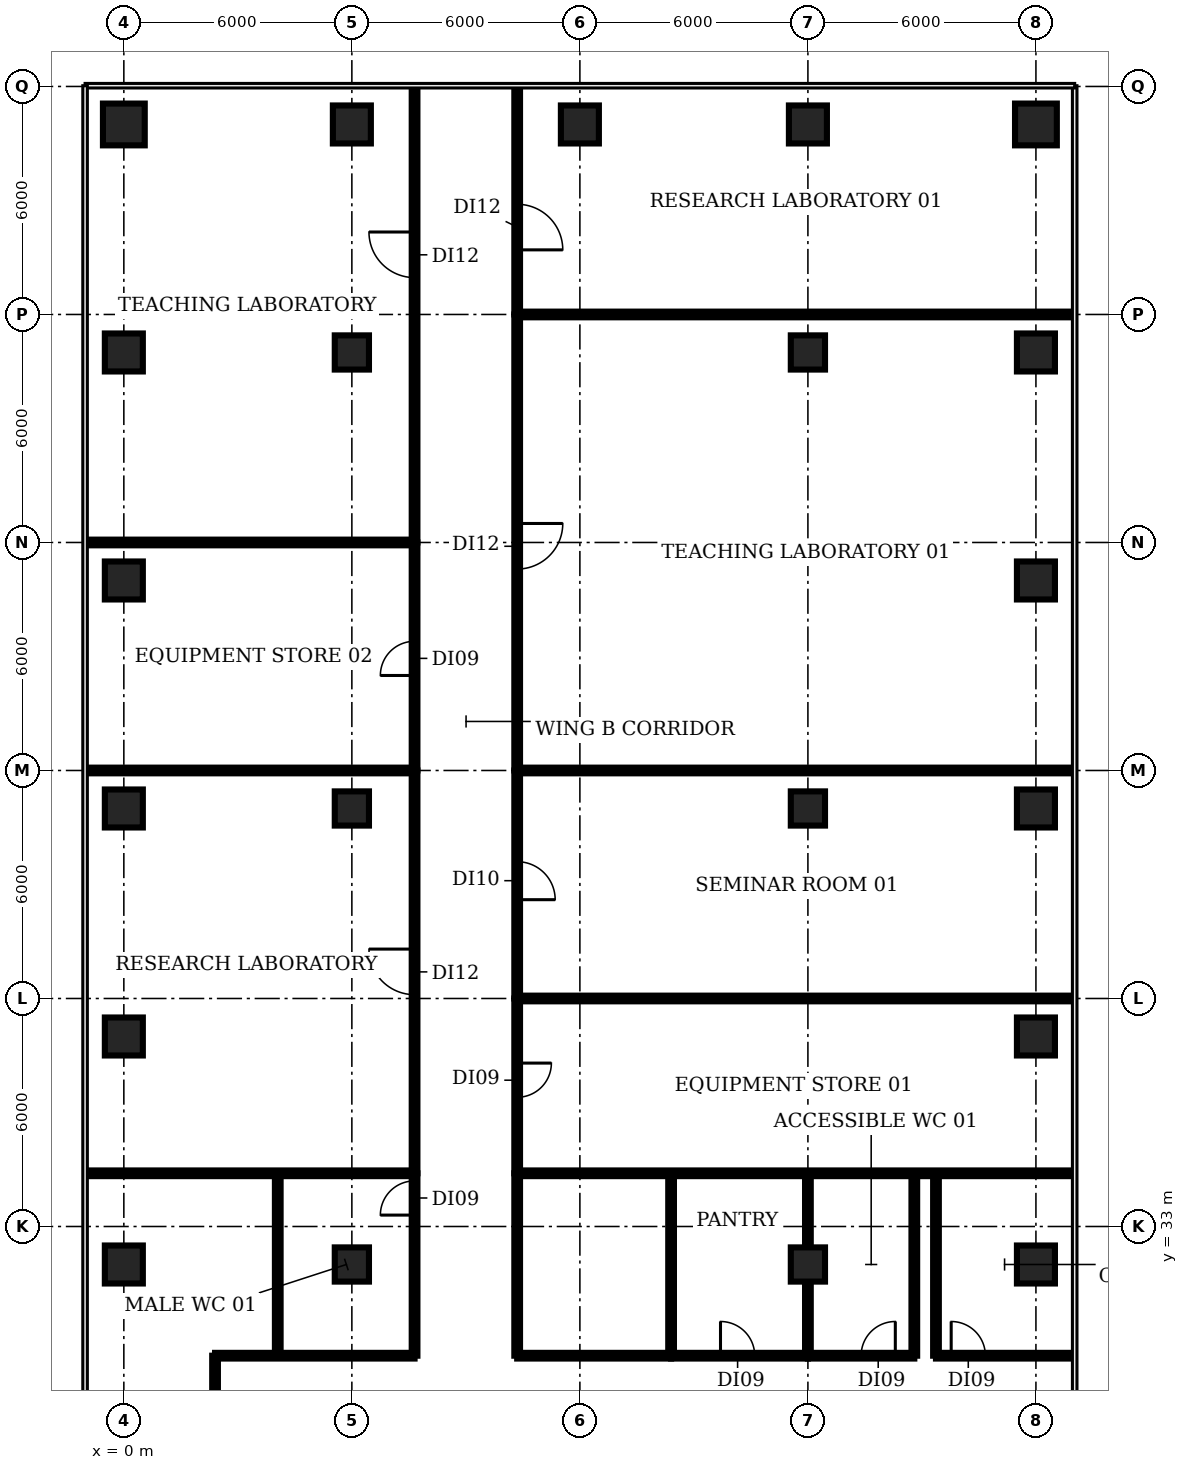
"""IFC4 building model, lengths in metres.
Left out: names, types, materials, properties, quantities, classifications, styles, units other than length and angle.
Written with IfcOpenShell. Run it as: python <this file> out.ifc"""

import sys

from ifc_helpers import new_model, si_unit, direction, frame, frame_2d, origin, origin_2d, place, context, subcontext, project, spatial, rectangle, circle, extrude, element, fill, save


model = new_model("IFC4")
c1 = context("Model", 3, precision=1e-05, world=origin(), true_north=direction((0.0, 1.0)))
c2 = subcontext(c1, "Body", "Model", "MODEL_VIEW")
j1 = project(units=[si_unit("LENGTHUNIT", "METRE"), si_unit("PLANEANGLEUNIT", "RADIAN")], contexts=[c1])
p1 = place(None, origin())
s1 = spatial("IfcSite", under=j1, at=p1, CompositionType="ELEMENT")
p2 = place(p1, origin())
s2 = spatial("IfcBuilding", under=s1, at=p2, CompositionType="ELEMENT")
p3 = place(p2, frame((0.0, 0.0, 20.0)))
s3 = spatial("IfcBuildingStorey", under=s2, at=p3, CompositionType="ELEMENT", Elevation=20.0)
for number, where, z_axis, x_axis in (
    (1, (0.0, 32.0, 0.0), (0.0, 0.0, 1.0), (1.0, 0.0, 0.0)),
    (2, (0.0, 38.0, 0.0), (0.0, 0.0, 1.0), (1.0, 0.0, 0.0)),
    (3, (0.0, 44.0, 0.0), (0.0, 0.0, 1.0), (1.0, 0.0, 0.0)),
    (4, (0.0, 50.0, 0.0), (0.0, 0.0, 1.0), (1.0, 0.0, 0.0)),
    (5, (0.0, 56.0, 0.0), (0.0, 0.0, 1.0), (1.0, 0.0, 0.0)),
):
    element("IfcColumn", number, at=place(p3, frame(where, z_axis=z_axis, x_axis=x_axis)), inside=s3, PredefinedType="COLUMN", context=c2, shape_type="SweptSolid", body=[
        extrude(rectangle(XDim=1.0, YDim=1.0, at=origin_2d()), origin(), (0.0, 0.0, 1.0), 4.15),
    ])
p4 = place(p3, frame((0.0, 62.0, 0.0), z_axis=(0.0, 0.0, 1.0), x_axis=(1.0, 0.0, 0.0)))
e6 = element("IfcColumn", 6, at=p4, inside=s3, PredefinedType="COLUMN", context=c2, shape_type="SweptSolid", body=[
    extrude(circle(Radius=0.55, at=origin_2d()), origin(), (0.0, 0.0, 1.0), 4.15),
])
for number, where, z_axis, x_axis in (
    (7, (6.0, 32.0, 0.0), (0.0, 0.0, 1.0), (1.0, 0.0, 0.0)),
    (8, (6.0, 44.0, 0.0), (0.0, 0.0, 1.0), (1.0, 0.0, 0.0)),
    (9, (6.0, 56.0, 0.0), (0.0, 0.0, 1.0), (1.0, 0.0, 0.0)),
):
    element("IfcColumn", number, at=place(p3, frame(where, z_axis=z_axis, x_axis=x_axis)), inside=s3, PredefinedType="COLUMN", context=c2, shape_type="SweptSolid", body=[
        extrude(rectangle(XDim=0.9, YDim=0.9, at=origin_2d()), origin(), (0.0, 0.0, 1.0), 4.15),
    ])
for number, where, z_axis, x_axis in (
    (10, (6.0, 62.0, 0.0), (0.0, 0.0, 1.0), (1.0, 0.0, 0.0)),
    (11, (12.0, 62.0, 0.0), (0.0, 0.0, 1.0), (1.0, 0.0, 0.0)),
):
    element("IfcColumn", number, at=place(p3, frame(where, z_axis=z_axis, x_axis=x_axis)), inside=s3, PredefinedType="COLUMN", context=c2, shape_type="SweptSolid", body=[
        extrude(rectangle(XDim=1.0, YDim=1.0, at=origin_2d()), origin(), (0.0, 0.0, 1.0), 4.15),
    ])
for number, where, z_axis, x_axis in (
    (12, (18.0, 32.0, 0.0), (0.0, 0.0, 1.0), (1.0, 0.0, 0.0)),
    (13, (18.0, 44.0, 0.0), (0.0, 0.0, 1.0), (1.0, 0.0, 0.0)),
    (14, (18.0, 56.0, 0.0), (0.0, 0.0, 1.0), (1.0, 0.0, 0.0)),
):
    element("IfcColumn", number, at=place(p3, frame(where, z_axis=z_axis, x_axis=x_axis)), inside=s3, PredefinedType="COLUMN", context=c2, shape_type="SweptSolid", body=[
        extrude(rectangle(XDim=0.9, YDim=0.9, at=origin_2d()), origin(), (0.0, 0.0, 1.0), 4.15),
    ])
for number, where, z_axis, x_axis in (
    (15, (18.0, 62.0, 0.0), (0.0, 0.0, 1.0), (1.0, 0.0, 0.0)),
    (16, (24.0, 32.0, 0.0), (0.0, 0.0, 1.0), (1.0, 0.0, 0.0)),
    (17, (24.0, 38.0, 0.0), (0.0, 0.0, 1.0), (1.0, 0.0, 0.0)),
    (18, (24.0, 44.0, 0.0), (0.0, 0.0, 1.0), (1.0, 0.0, 0.0)),
    (19, (24.0, 50.0, 0.0), (0.0, 0.0, 1.0), (1.0, 0.0, 0.0)),
    (20, (24.0, 56.0, 0.0), (0.0, 0.0, 1.0), (1.0, 0.0, 0.0)),
):
    element("IfcColumn", number, at=place(p3, frame(where, z_axis=z_axis, x_axis=x_axis)), inside=s3, PredefinedType="COLUMN", context=c2, shape_type="SweptSolid", body=[
        extrude(rectangle(XDim=1.0, YDim=1.0, at=origin_2d()), origin(), (0.0, 0.0, 1.0), 4.15),
    ])
p5 = place(p3, frame((24.0, 62.0, 0.0), z_axis=(0.0, 0.0, 1.0), x_axis=(1.0, 0.0, 0.0)))
e21 = element("IfcColumn", 21, at=p5, inside=s3, PredefinedType="COLUMN", context=c2, shape_type="SweptSolid", body=[
    extrude(circle(Radius=0.55, at=origin_2d()), origin(), (0.0, 0.0, 1.0), 4.15),
])
for number, where, z_axis, x_axis in (
    (22, (-0.97, 34.4, 0.0), (0.0, 0.0, 1.0), (1.0, 0.0, 0.0)),
    (23, (-0.97, 45.0, 0.0), (0.0, 0.0, 1.0), (1.0, 0.0, 0.0)),
    (24, (-0.97, 51.0, 0.0), (0.0, 0.0, 1.0), (1.0, 0.0, 0.0)),
):
    element("IfcWall", number, at=place(p3, frame(where, z_axis=z_axis, x_axis=x_axis)), inside=s3, PredefinedType="PARTITIONING", context=c2, shape_type="SweptSolid", body=[
        extrude(rectangle(XDim=8.62, YDim=0.15, at=frame_2d((4.31, 0.0))), origin(), (0.0, 0.0, 1.0), 3.08),
    ])
p6 = place(p3, frame((2.4, 25.7, 0.0), z_axis=(0.0, 0.0, 1.0), x_axis=(0.0, 1.0, 0.0)))
e25 = element("IfcWall", 25, at=p6, inside=s3, PredefinedType="PARTITIONING", context=c2, shape_type="SweptSolid", body=[
    extrude(rectangle(XDim=3.9, YDim=0.15, at=frame_2d((1.95, 0.0))), origin(), (0.0, 0.0, 1.0), 3.08),
])
p7 = place(p3, frame((2.4, 29.6, 0.0), z_axis=(0.0, 0.0, 1.0), x_axis=(1.0, 0.0, 0.0)))
e26 = element("IfcWall", 26, at=p7, inside=s3, PredefinedType="PARTITIONING", context=c2, shape_type="SweptSolid", body=[
    extrude(rectangle(XDim=5.25, YDim=0.15, at=frame_2d((2.625, 0.0))), origin(), (0.0, 0.0, 1.0), 3.08),
])
p8 = place(p3, frame((4.05, 29.6, 0.0), z_axis=(0.0, 0.0, 1.0), x_axis=(0.0, 1.0, 0.0)))
e27 = element("IfcWall", 27, at=p8, inside=s3, PredefinedType="PARTITIONING", context=c2, shape_type="SweptSolid", body=[
    extrude(rectangle(XDim=4.8, YDim=0.15, at=frame_2d((2.4, 0.0))), origin(), (0.0, 0.0, 1.0), 3.08),
])
p9 = place(p3, frame((7.65, 29.6, 0.0), z_axis=(0.0, 0.0, 1.0), x_axis=(0.0, 1.0, 0.0)))
e28 = element("IfcWall", 28, at=p9, inside=s3, PredefinedType="PARTITIONING", context=c2, shape_type="SweptSolid", body=[
    extrude(rectangle(XDim=4.8, YDim=0.15, at=frame_2d((2.4, 0.0))), origin(), (0.0, 0.0, 1.0), 3.08),
])
p10 = place(p9, frame((3.7, 0.0, 0.0)))
e29 = element("IfcOpeningElement", 29, at=p10, cuts=e28, PredefinedType="OPENING", context=c2, shape_type="SweptSolid", body=[
    extrude(rectangle(XDim=0.9, YDim=2.1, at=frame_2d((0.45, 1.05))), frame((0.0, 0.085, 0.0), z_axis=(0.0, -1.0, 0.0), x_axis=(1.0, 0.0, 0.0)), (0.0, 0.0, 1.0), 0.17),
])
p11 = place(p3, frame((7.65, 34.4, 0.0), z_axis=(0.0, 0.0, 1.0), x_axis=(0.0, 1.0, 0.0)))
e30 = element("IfcWall", 30, at=p11, inside=s3, PredefinedType="PARTITIONING", context=c2, shape_type="SweptSolid", body=[
    extrude(rectangle(XDim=10.6, YDim=0.15, at=frame_2d((5.3, 0.0))), origin(), (0.0, 0.0, 1.0), 3.08),
])
p12 = place(p11, frame((4.7, 0.0, 0.0)))
e31 = element("IfcOpeningElement", 31, at=p12, cuts=e30, PredefinedType="OPENING", context=c2, shape_type="SweptSolid", body=[
    extrude(rectangle(XDim=1.2, YDim=2.1, at=frame_2d((0.6, 1.05))), frame((0.0, 0.085, 0.0), z_axis=(0.0, -1.0, 0.0), x_axis=(1.0, 0.0, 0.0)), (0.0, 0.0, 1.0), 0.17),
])
p13 = place(p3, frame((7.65, 45.0, 0.0), z_axis=(0.0, 0.0, 1.0), x_axis=(0.0, 1.0, 0.0)))
e32 = element("IfcWall", 32, at=p13, inside=s3, PredefinedType="PARTITIONING", context=c2, shape_type="SweptSolid", body=[
    extrude(rectangle(XDim=6.0, YDim=0.15, at=frame_2d((3.0, 0.0))), origin(), (0.0, 0.0, 1.0), 3.08),
])
p14 = place(p13, frame((2.5, 0.0, 0.0)))
e33 = element("IfcOpeningElement", 33, at=p14, cuts=e32, PredefinedType="OPENING", context=c2, shape_type="SweptSolid", body=[
    extrude(rectangle(XDim=0.9, YDim=2.1, at=frame_2d((0.45, 1.05))), frame((0.0, 0.085, 0.0), z_axis=(0.0, -1.0, 0.0), x_axis=(1.0, 0.0, 0.0)), (0.0, 0.0, 1.0), 0.17),
])
p15 = place(p3, frame((7.65, 51.0, 0.0), z_axis=(0.0, 0.0, 1.0), x_axis=(0.0, 1.0, 0.0)))
e34 = element("IfcWall", 34, at=p15, inside=s3, PredefinedType="PARTITIONING", context=c2, shape_type="SweptSolid", body=[
    extrude(rectangle(XDim=11.97, YDim=0.15, at=frame_2d((5.985, 0.0))), origin(), (0.0, 0.0, 1.0), 3.08),
])
p16 = place(p15, frame((6.97, 0.0, 0.0)))
e35 = element("IfcOpeningElement", 35, at=p16, cuts=e34, PredefinedType="OPENING", context=c2, shape_type="SweptSolid", body=[
    extrude(rectangle(XDim=1.2, YDim=2.1, at=frame_2d((0.6, 1.05))), frame((0.0, 0.085, 0.0), z_axis=(0.0, -1.0, 0.0), x_axis=(1.0, 0.0, 0.0)), (0.0, 0.0, 1.0), 0.17),
])
p17 = place(p3, frame((10.35, 29.6, 0.0), z_axis=(0.0, 0.0, 1.0), x_axis=(0.0, 1.0, 0.0)))
e36 = element("IfcWall", 36, at=p17, inside=s3, PredefinedType="PARTITIONING", context=c2, shape_type="SweptSolid", body=[
    extrude(rectangle(XDim=4.8, YDim=0.15, at=frame_2d((2.4, 0.0))), origin(), (0.0, 0.0, 1.0), 3.08),
])
p18 = place(p3, frame((10.35, 29.6, 0.0), z_axis=(0.0, 0.0, 1.0), x_axis=(1.0, 0.0, 0.0)))
e37 = element("IfcWall", 37, at=p18, inside=s3, PredefinedType="PARTITIONING", context=c2, shape_type="SweptSolid", body=[
    extrude(rectangle(XDim=4.05, YDim=0.15, at=frame_2d((2.025, 0.0))), origin(), (0.0, 0.0, 1.0), 3.08),
])
p19 = place(p3, frame((10.35, 34.4, 0.0), z_axis=(0.0, 0.0, 1.0), x_axis=(1.0, 0.0, 0.0)))
e38 = element("IfcWall", 38, at=p19, inside=s3, PredefinedType="PARTITIONING", context=c2, shape_type="SweptSolid", body=[
    extrude(rectangle(XDim=14.62, YDim=0.15, at=frame_2d((7.31, 0.0))), origin(), (0.0, 0.0, 1.0), 3.08),
])
p20 = place(p3, frame((10.35, 39.0, 0.0), z_axis=(0.0, 0.0, 1.0), x_axis=(0.0, -1.0, 0.0)))
e39 = element("IfcWall", 39, at=p20, inside=s3, PredefinedType="PARTITIONING", context=c2, shape_type="SweptSolid", body=[
    extrude(rectangle(XDim=4.6, YDim=0.15, at=frame_2d((2.3, 0.0))), origin(), (0.0, 0.0, 1.0), 3.08),
])
p21 = place(p20, frame((1.7, 0.0, 0.0)))
e40 = element("IfcOpeningElement", 40, at=p21, cuts=e39, PredefinedType="OPENING", context=c2, shape_type="SweptSolid", body=[
    extrude(rectangle(XDim=0.9, YDim=2.1, at=frame_2d((0.45, 1.05))), frame((0.0, 0.085, 0.0), z_axis=(0.0, -1.0, 0.0), x_axis=(1.0, 0.0, 0.0)), (0.0, 0.0, 1.0), 0.17),
])
p22 = place(p3, frame((10.35, 39.0, 0.0), z_axis=(0.0, 0.0, 1.0), x_axis=(1.0, 0.0, 0.0)))
e41 = element("IfcWall", 41, at=p22, inside=s3, PredefinedType="PARTITIONING", context=c2, shape_type="SweptSolid", body=[
    extrude(rectangle(XDim=14.62, YDim=0.15, at=frame_2d((7.31, 0.0))), origin(), (0.0, 0.0, 1.0), 3.08),
])
p23 = place(p3, frame((10.35, 45.0, 0.0), z_axis=(0.0, 0.0, 1.0), x_axis=(0.0, -1.0, 0.0)))
e42 = element("IfcWall", 42, at=p23, inside=s3, PredefinedType="PARTITIONING", context=c2, shape_type="SweptSolid", body=[
    extrude(rectangle(XDim=6.0, YDim=0.15, at=frame_2d((3.0, 0.0))), origin(), (0.0, 0.0, 1.0), 3.08),
])
p24 = place(p23, frame((2.4, 0.0, 0.0)))
e43 = element("IfcOpeningElement", 43, at=p24, cuts=e42, PredefinedType="OPENING", context=c2, shape_type="SweptSolid", body=[
    extrude(rectangle(XDim=1.0, YDim=2.1, at=frame_2d((0.5, 1.05))), frame((0.0, 0.085, 0.0), z_axis=(0.0, -1.0, 0.0), x_axis=(1.0, 0.0, 0.0)), (0.0, 0.0, 1.0), 0.17),
])
p25 = place(p3, frame((10.35, 45.0, 0.0), z_axis=(0.0, 0.0, 1.0), x_axis=(1.0, 0.0, 0.0)))
e44 = element("IfcWall", 44, at=p25, inside=s3, PredefinedType="PARTITIONING", context=c2, shape_type="SweptSolid", body=[
    extrude(rectangle(XDim=14.62, YDim=0.15, at=frame_2d((7.31, 0.0))), origin(), (0.0, 0.0, 1.0), 3.08),
])
p26 = place(p3, frame((10.35, 57.0, 0.0), z_axis=(0.0, 0.0, 1.0), x_axis=(0.0, -1.0, 0.0)))
e45 = element("IfcWall", 45, at=p26, inside=s3, PredefinedType="PARTITIONING", context=c2, shape_type="SweptSolid", body=[
    extrude(rectangle(XDim=12.0, YDim=0.15, at=frame_2d((6.0, 0.0))), origin(), (0.0, 0.0, 1.0), 3.08),
])
p27 = place(p26, frame((5.5, 0.0, 0.0)))
e46 = element("IfcOpeningElement", 46, at=p27, cuts=e45, PredefinedType="OPENING", context=c2, shape_type="SweptSolid", body=[
    extrude(rectangle(XDim=1.2, YDim=2.1, at=frame_2d((0.6, 1.05))), frame((0.0, 0.085, 0.0), z_axis=(0.0, -1.0, 0.0), x_axis=(1.0, 0.0, 0.0)), (0.0, 0.0, 1.0), 0.17),
])
p28 = place(p3, frame((10.35, 57.0, 0.0), z_axis=(0.0, 0.0, 1.0), x_axis=(1.0, 0.0, 0.0)))
e47 = element("IfcWall", 47, at=p28, inside=s3, PredefinedType="PARTITIONING", context=c2, shape_type="SweptSolid", body=[
    extrude(rectangle(XDim=14.605, YDim=0.15, at=frame_2d((7.302, 0.0))), origin(), (0.0, 0.0, 1.0), 3.08),
])
p29 = place(p3, frame((10.35, 62.97, 0.0), z_axis=(0.0, 0.0, 1.0), x_axis=(0.0, -1.0, 0.0)))
e48 = element("IfcWall", 48, at=p29, inside=s3, PredefinedType="PARTITIONING", context=c2, shape_type="SweptSolid", body=[
    extrude(rectangle(XDim=5.97, YDim=0.15, at=frame_2d((2.985, 0.0))), origin(), (0.0, 0.0, 1.0), 3.08),
])
p30 = place(p29, frame((3.07, 0.0, 0.0)))
e49 = element("IfcOpeningElement", 49, at=p30, cuts=e48, PredefinedType="OPENING", context=c2, shape_type="SweptSolid", body=[
    extrude(rectangle(XDim=1.2, YDim=2.1, at=frame_2d((0.6, 1.05))), frame((0.0, 0.085, 0.0), z_axis=(0.0, -1.0, 0.0), x_axis=(1.0, 0.0, 0.0)), (0.0, 0.0, 1.0), 0.17),
])
p31 = place(p3, frame((14.4, 29.6, 0.0), z_axis=(0.0, 0.0, 1.0), x_axis=(0.0, 1.0, 0.0)))
e50 = element("IfcWall", 50, at=p31, inside=s3, PredefinedType="PARTITIONING", context=c2, shape_type="SweptSolid", body=[
    extrude(rectangle(XDim=4.8, YDim=0.15, at=frame_2d((2.4, 0.0))), origin(), (0.0, 0.0, 1.0), 3.08),
])
p32 = place(p3, frame((14.4, 29.6, 0.0), z_axis=(0.0, 0.0, 1.0), x_axis=(1.0, 0.0, 0.0)))
e51 = element("IfcWall", 51, at=p32, inside=s3, PredefinedType="PARTITIONING", context=c2, shape_type="SweptSolid", body=[
    extrude(rectangle(XDim=3.6, YDim=0.15, at=frame_2d((1.8, 0.0))), origin(), (0.0, 0.0, 1.0), 3.08),
])
p33 = place(p32, frame((1.3, 0.0, 0.0)))
e52 = element("IfcOpeningElement", 52, at=p33, cuts=e51, PredefinedType="OPENING", context=c2, shape_type="SweptSolid", body=[
    extrude(rectangle(XDim=0.9, YDim=2.1, at=frame_2d((0.45, 1.05))), frame((0.0, 0.085, 0.0), z_axis=(0.0, -1.0, 0.0), x_axis=(1.0, 0.0, 0.0)), (0.0, 0.0, 1.0), 0.17),
])
p34 = place(p3, frame((18.0, 29.6, 0.0), z_axis=(0.0, 0.0, 1.0), x_axis=(0.0, 1.0, 0.0)))
e53 = element("IfcWall", 53, at=p34, inside=s3, PredefinedType="PARTITIONING", context=c2, shape_type="SweptSolid", body=[
    extrude(rectangle(XDim=4.8, YDim=0.15, at=frame_2d((2.4, 0.0))), origin(), (0.0, 0.0, 1.0), 3.08),
])
p35 = place(p3, frame((18.0, 29.6, 0.0), z_axis=(0.0, 0.0, 1.0), x_axis=(1.0, 0.0, 0.0)))
e54 = element("IfcWall", 54, at=p35, inside=s3, PredefinedType="PARTITIONING", context=c2, shape_type="SweptSolid", body=[
    extrude(rectangle(XDim=2.8, YDim=0.15, at=frame_2d((1.4, 0.0))), origin(), (0.0, 0.0, 1.0), 3.08),
])
p36 = place(p35, frame((1.4, 0.0, 0.0)))
e55 = element("IfcOpeningElement", 55, at=p36, cuts=e54, PredefinedType="OPENING", context=c2, shape_type="SweptSolid", body=[
    extrude(rectangle(XDim=0.9, YDim=2.1, at=frame_2d((0.45, 1.05))), frame((0.0, 0.085, 0.0), z_axis=(0.0, -1.0, 0.0), x_axis=(1.0, 0.0, 0.0)), (0.0, 0.0, 1.0), 0.17),
])
for number, where, z_axis, x_axis in (
    (56, (20.8, 29.6, 0.0), (0.0, 0.0, 1.0), (0.0, 1.0, 0.0)),
    (57, (21.37, 29.6, 0.0), (0.0, 0.0, 1.0), (0.0, 1.0, 0.0)),
):
    element("IfcWall", number, at=place(p3, frame(where, z_axis=z_axis, x_axis=x_axis)), inside=s3, PredefinedType="PARTITIONING", context=c2, shape_type="SweptSolid", body=[
        extrude(rectangle(XDim=4.8, YDim=0.15, at=frame_2d((2.4, 0.0))), origin(), (0.0, 0.0, 1.0), 3.08),
    ])
p37 = place(p3, frame((21.37, 29.6, 0.0), z_axis=(0.0, 0.0, 1.0), x_axis=(1.0, 0.0, 0.0)))
e58 = element("IfcWall", 58, at=p37, inside=s3, PredefinedType="PARTITIONING", context=c2, shape_type="SweptSolid", body=[
    extrude(rectangle(XDim=3.6, YDim=0.15, at=frame_2d((1.8, 0.0))), origin(), (0.0, 0.0, 1.0), 3.08),
])
p38 = place(p37, frame((0.4, 0.0, 0.0)))
e59 = element("IfcOpeningElement", 59, at=p38, cuts=e58, PredefinedType="OPENING", context=c2, shape_type="SweptSolid", body=[
    extrude(rectangle(XDim=0.9, YDim=2.1, at=frame_2d((0.45, 1.05))), frame((0.0, 0.085, 0.0), z_axis=(0.0, -1.0, 0.0), x_axis=(1.0, 0.0, 0.0)), (0.0, 0.0, 1.0), 0.17),
])
p39 = place(p10, origin())
e60 = element("IfcDoor", 60, at=p39, inside=s3, OperationType="SINGLE_SWING_LEFT", PredefinedType="DOOR", context=c2, shape_type="SweptSolid", body=[
    extrude(rectangle(XDim=0.9, YDim=2.1, at=frame_2d((0.45, 1.05))), frame((0.0, 0.025, 0.0), z_axis=(0.0, -1.0, 0.0), x_axis=(1.0, 0.0, 0.0)), (0.0, 0.0, 1.0), 0.05),
])
fill(e29, e60)
p40 = place(p12, origin())
e61 = element("IfcDoor", 61, at=p40, inside=s3, OperationType="SINGLE_SWING_RIGHT", PredefinedType="DOOR", context=c2, shape_type="SweptSolid", body=[
    extrude(rectangle(XDim=1.2, YDim=2.1, at=frame_2d((0.6, 1.05))), frame((0.0, 0.025, 0.0), z_axis=(0.0, -1.0, 0.0), x_axis=(1.0, 0.0, 0.0)), (0.0, 0.0, 1.0), 0.05),
])
fill(e31, e61)
p41 = place(p14, origin())
e62 = element("IfcDoor", 62, at=p41, inside=s3, OperationType="SINGLE_SWING_LEFT", PredefinedType="DOOR", context=c2, shape_type="SweptSolid", body=[
    extrude(rectangle(XDim=0.9, YDim=2.1, at=frame_2d((0.45, 1.05))), frame((0.0, 0.025, 0.0), z_axis=(0.0, -1.0, 0.0), x_axis=(1.0, 0.0, 0.0)), (0.0, 0.0, 1.0), 0.05),
])
fill(e33, e62)
p42 = place(p16, origin())
e63 = element("IfcDoor", 63, at=p42, inside=s3, OperationType="SINGLE_SWING_RIGHT", PredefinedType="DOOR", context=c2, shape_type="SweptSolid", body=[
    extrude(rectangle(XDim=1.2, YDim=2.1, at=frame_2d((0.6, 1.05))), frame((0.0, 0.025, 0.0), z_axis=(0.0, -1.0, 0.0), x_axis=(1.0, 0.0, 0.0)), (0.0, 0.0, 1.0), 0.05),
])
fill(e35, e63)
p43 = place(p21, origin())
e64 = element("IfcDoor", 64, at=p43, inside=s3, OperationType="SINGLE_SWING_LEFT", PredefinedType="DOOR", context=c2, shape_type="SweptSolid", body=[
    extrude(rectangle(XDim=0.9, YDim=2.1, at=frame_2d((0.45, 1.05))), frame((0.0, 0.025, 0.0), z_axis=(0.0, -1.0, 0.0), x_axis=(1.0, 0.0, 0.0)), (0.0, 0.0, 1.0), 0.05),
])
fill(e40, e64)
p44 = place(p24, origin())
e65 = element("IfcDoor", 65, at=p44, inside=s3, OperationType="SINGLE_SWING_RIGHT", PredefinedType="DOOR", context=c2, shape_type="SweptSolid", body=[
    extrude(rectangle(XDim=1.0, YDim=2.1, at=frame_2d((0.5, 1.05))), frame((0.0, 0.025, 0.0), z_axis=(0.0, -1.0, 0.0), x_axis=(1.0, 0.0, 0.0)), (0.0, 0.0, 1.0), 0.05),
])
fill(e43, e65)
p45 = place(p27, origin())
e66 = element("IfcDoor", 66, at=p45, inside=s3, OperationType="SINGLE_SWING_LEFT", PredefinedType="DOOR", context=c2, shape_type="SweptSolid", body=[
    extrude(rectangle(XDim=1.2, YDim=2.1, at=frame_2d((0.6, 1.05))), frame((0.0, 0.025, 0.0), z_axis=(0.0, -1.0, 0.0), x_axis=(1.0, 0.0, 0.0)), (0.0, 0.0, 1.0), 0.05),
])
fill(e46, e66)
p46 = place(p30, origin())
e67 = element("IfcDoor", 67, at=p46, inside=s3, OperationType="SINGLE_SWING_RIGHT", PredefinedType="DOOR", context=c2, shape_type="SweptSolid", body=[
    extrude(rectangle(XDim=1.2, YDim=2.1, at=frame_2d((0.6, 1.05))), frame((0.0, 0.025, 0.0), z_axis=(0.0, -1.0, 0.0), x_axis=(1.0, 0.0, 0.0)), (0.0, 0.0, 1.0), 0.05),
])
fill(e49, e67)
p47 = place(p33, origin())
e68 = element("IfcDoor", 68, at=p47, inside=s3, OperationType="SINGLE_SWING_LEFT", PredefinedType="DOOR", context=c2, shape_type="SweptSolid", body=[
    extrude(rectangle(XDim=0.9, YDim=2.1, at=frame_2d((0.45, 1.05))), frame((0.0, 0.025, 0.0), z_axis=(0.0, -1.0, 0.0), x_axis=(1.0, 0.0, 0.0)), (0.0, 0.0, 1.0), 0.05),
])
fill(e52, e68)
p48 = place(p36, origin())
e69 = element("IfcDoor", 69, at=p48, inside=s3, OperationType="SINGLE_SWING_RIGHT", PredefinedType="DOOR", context=c2, shape_type="SweptSolid", body=[
    extrude(rectangle(XDim=0.9, YDim=2.1, at=frame_2d((0.45, 1.05))), frame((0.0, 0.025, 0.0), z_axis=(0.0, -1.0, 0.0), x_axis=(1.0, 0.0, 0.0)), (0.0, 0.0, 1.0), 0.05),
])
fill(e55, e69)
p49 = place(p38, origin())
e70 = element("IfcDoor", 70, at=p49, inside=s3, OperationType="SINGLE_SWING_LEFT", PredefinedType="DOOR", context=c2, shape_type="SweptSolid", body=[
    extrude(rectangle(XDim=0.9, YDim=2.1, at=frame_2d((0.45, 1.05))), frame((0.0, 0.025, 0.0), z_axis=(0.0, -1.0, 0.0), x_axis=(1.0, 0.0, 0.0)), (0.0, 0.0, 1.0), 0.05),
])
fill(e59, e70)
save(model, sys.argv[1])
